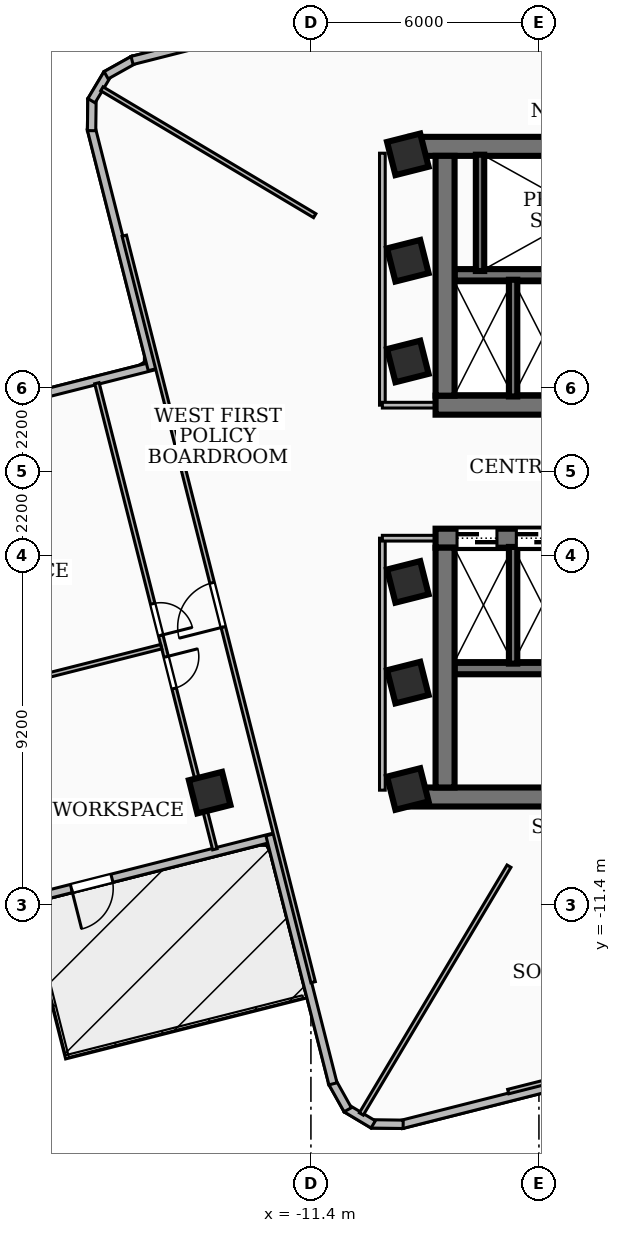
"""IFC4 building model, lengths in metres.
Left out: names, types, materials, properties, quantities, classifications, styles, units other than length and angle.
Written with IfcOpenShell. Run it as: python <this file> out.ifc"""

import sys

from ifc_helpers import new_model, si_unit, direction, frame, frame_2d, origin, origin_2d, place, context, subcontext, project, spatial, rectangle, extrude, element, fill, save


model = new_model("IFC4")
c1 = context("Model", 3, precision=1e-05, world=origin(), true_north=direction((0.0, 1.0)))
c2 = subcontext(c1, "Body", "Model", "MODEL_VIEW")
j1 = project(units=[si_unit("LENGTHUNIT", "METRE"), si_unit("PLANEANGLEUNIT", "RADIAN")], contexts=[c1])
p1 = place(None, origin())
s1 = spatial("IfcSite", under=j1, at=p1, CompositionType="ELEMENT")
p2 = place(p1, origin())
s2 = spatial("IfcBuilding", under=s1, at=p2, CompositionType="ELEMENT")
p3 = place(p2, frame((0.0, 0.0, 127.08)))
s3 = spatial("IfcBuildingStorey", under=s2, at=p3, CompositionType="ELEMENT", Elevation=127.08)
p4 = place(p3, frame((-8.78, 8.56, 0.0), z_axis=(0.0, 0.0, 1.0), x_axis=(1.0, 0.0, 0.0)))
e1 = element("IfcWall", 1, at=p4, inside=s3, PredefinedType="SHEAR", context=c2, shape_type="SweptSolid", body=[
    extrude(rectangle(XDim=17.56, YDim=0.5, at=frame_2d((8.78, 0.0))), origin(), (0.0, 0.0, 1.0), 3.34),
])
p5 = place(p3, frame((8.12, 1.75, 0.0), z_axis=(0.0, 0.0, 1.0), x_axis=(-1.0, 0.0, 0.0)))
e2 = element("IfcWall", 2, at=p5, inside=s3, PredefinedType="SHEAR", context=c2, shape_type="SweptSolid", body=[
    extrude(rectangle(XDim=16.24, YDim=0.5, at=frame_2d((8.12, 0.0))), origin(), (0.0, 0.0, 1.0), 3.34),
])
p6 = place(p5, frame((7.45, 0.0, 0.0)))
e3 = element("IfcOpeningElement", 3, at=p6, cuts=e2, PredefinedType="OPENING", context=c2, shape_type="SweptSolid", body=[
    extrude(rectangle(XDim=1.0, YDim=2.1, at=frame_2d((0.5, 1.05))), frame((0.0, 0.26, 0.0), z_axis=(0.0, -1.0, 0.0), x_axis=(1.0, 0.0, 0.0)), (0.0, 0.0, 1.0), 0.52),
])
p7 = place(p5, frame((3.85, 0.0, 0.0)))
e4 = element("IfcOpeningElement", 4, at=p7, cuts=e2, PredefinedType="OPENING", context=c2, shape_type="SweptSolid", body=[
    extrude(rectangle(XDim=0.9, YDim=2.06, at=frame_2d((0.45, 1.03))), frame((0.0, 0.26, 0.0), z_axis=(0.0, -1.0, 0.0), x_axis=(1.0, 0.0, 0.0)), (0.0, 0.0, 1.0), 0.52),
])
p8 = place(p5, frame((2.35, 0.0, 0.0)))
e5 = element("IfcOpeningElement", 5, at=p8, cuts=e2, PredefinedType="OPENING", context=c2, shape_type="SweptSolid", body=[
    extrude(rectangle(XDim=0.9, YDim=2.06, at=frame_2d((0.45, 1.03))), frame((0.0, 0.26, 0.0), z_axis=(0.0, -1.0, 0.0), x_axis=(1.0, 0.0, 0.0)), (0.0, 0.0, 1.0), 0.52),
])
p9 = place(p5, frame((0.8, 0.0, 0.0)))
e6 = element("IfcOpeningElement", 6, at=p9, cuts=e2, PredefinedType="OPENING", context=c2, shape_type="SweptSolid", body=[
    extrude(rectangle(XDim=0.9, YDim=2.06, at=frame_2d((0.45, 1.03))), frame((0.0, 0.26, 0.0), z_axis=(0.0, -1.0, 0.0), x_axis=(1.0, 0.0, 0.0)), (0.0, 0.0, 1.0), 0.52),
])
p10 = place(p3, frame((-7.87, 2.0, 0.0), z_axis=(0.0, 0.0, 1.0), x_axis=(0.0, 1.0, 0.0)))
e7 = element("IfcWall", 7, at=p10, inside=s3, PredefinedType="SHEAR", context=c2, shape_type="SweptSolid", body=[
    extrude(rectangle(XDim=6.31, YDim=0.5, at=frame_2d((3.155, 0.0))), origin(), (0.0, 0.0, 1.0), 3.34),
])
p11 = place(p3, frame((7.62, 5.18, 0.0), z_axis=(0.0, 0.0, 1.0), x_axis=(-1.0, 0.0, 0.0)))
e8 = element("IfcWall", 8, at=p11, inside=s3, PredefinedType="SOLIDWALL", context=c2, shape_type="SweptSolid", body=[
    extrude(rectangle(XDim=15.24, YDim=0.3, at=frame_2d((7.62, 0.0))), origin(), (0.0, 0.0, 1.0), 3.34),
])
p12 = place(p11, frame((5.77, 0.0, 0.0)))
e9 = element("IfcOpeningElement", 9, at=p12, cuts=e8, PredefinedType="OPENING", context=c2, shape_type="SweptSolid", body=[
    extrude(rectangle(XDim=1.1, YDim=2.15, at=frame_2d((0.55, 1.075))), frame((0.0, 0.16, 0.0), z_axis=(0.0, -1.0, 0.0), x_axis=(1.0, 0.0, 0.0)), (0.0, 0.0, 1.0), 0.32),
])
p13 = place(p11, frame((2.97, 0.0, 0.0)))
e10 = element("IfcOpeningElement", 10, at=p13, cuts=e8, PredefinedType="OPENING", context=c2, shape_type="SweptSolid", body=[
    extrude(rectangle(XDim=1.1, YDim=2.15, at=frame_2d((0.55, 1.075))), frame((0.0, 0.16, 0.0), z_axis=(0.0, -1.0, 0.0), x_axis=(1.0, 0.0, 0.0)), (0.0, 0.0, 1.0), 0.32),
])
p14 = place(p11, frame((7.97, 0.0, 0.0)))
e11 = element("IfcOpeningElement", 11, at=p14, cuts=e8, PredefinedType="OPENING", context=c2, shape_type="SweptSolid", body=[
    extrude(rectangle(XDim=1.0, YDim=2.1, at=frame_2d((0.5, 1.05))), frame((0.0, 0.16, 0.0), z_axis=(0.0, -1.0, 0.0), x_axis=(1.0, 0.0, 0.0)), (0.0, 0.0, 1.0), 0.32),
])
p15 = place(p3, frame((8.78, -8.56, 0.0), z_axis=(0.0, 0.0, 1.0), x_axis=(-1.0, 0.0, 0.0)))
e12 = element("IfcWall", 12, at=p15, inside=s3, PredefinedType="SHEAR", context=c2, shape_type="SweptSolid", body=[
    extrude(rectangle(XDim=17.56, YDim=0.5, at=frame_2d((8.78, 0.0))), origin(), (0.0, 0.0, 1.0), 3.34),
])
p16 = place(p3, frame((-8.12, -1.75, 0.0), z_axis=(0.0, 0.0, 1.0), x_axis=(1.0, 0.0, 0.0)))
e13 = element("IfcWall", 13, at=p16, inside=s3, PredefinedType="SHEAR", context=c2, shape_type="SweptSolid", body=[
    extrude(rectangle(XDim=16.24, YDim=0.5, at=frame_2d((8.12, 0.0))), origin(), (0.0, 0.0, 1.0), 3.34),
])
p17 = place(p16, frame((7.45, 0.0, 0.0)))
e14 = element("IfcOpeningElement", 14, at=p17, cuts=e13, PredefinedType="OPENING", context=c2, shape_type="SweptSolid", body=[
    extrude(rectangle(XDim=1.0, YDim=2.1, at=frame_2d((0.5, 1.05))), frame((0.0, 0.26, 0.0), z_axis=(0.0, -1.0, 0.0), x_axis=(1.0, 0.0, 0.0)), (0.0, 0.0, 1.0), 0.52),
])
p18 = place(p16, frame((12.65, 0.0, 0.0)))
e15 = element("IfcOpeningElement", 15, at=p18, cuts=e13, PredefinedType="OPENING", context=c2, shape_type="SweptSolid", body=[
    extrude(rectangle(XDim=0.9, YDim=2.06, at=frame_2d((0.45, 1.03))), frame((0.0, 0.26, 0.0), z_axis=(0.0, -1.0, 0.0), x_axis=(1.0, 0.0, 0.0)), (0.0, 0.0, 1.0), 0.52),
])
p19 = place(p16, frame((0.565, 0.0, 0.0)))
e16 = element("IfcOpeningElement", 16, at=p19, cuts=e13, PredefinedType="OPENING", context=c2, shape_type="SweptSolid", body=[
    extrude(rectangle(XDim=1.05, YDim=2.15, at=frame_2d((0.525, 1.075))), frame((0.0, 0.26, 0.0), z_axis=(0.0, -1.0, 0.0), x_axis=(1.0, 0.0, 0.0)), (0.0, 0.0, 1.0), 0.52),
])
p20 = place(p16, frame((2.125, 0.0, 0.0)))
e17 = element("IfcOpeningElement", 17, at=p20, cuts=e13, PredefinedType="OPENING", context=c2, shape_type="SweptSolid", body=[
    extrude(rectangle(XDim=1.05, YDim=2.15, at=frame_2d((0.525, 1.075))), frame((0.0, 0.26, 0.0), z_axis=(0.0, -1.0, 0.0), x_axis=(1.0, 0.0, 0.0)), (0.0, 0.0, 1.0), 0.52),
])
p21 = place(p16, frame((3.685, 0.0, 0.0)))
e18 = element("IfcOpeningElement", 18, at=p21, cuts=e13, PredefinedType="OPENING", context=c2, shape_type="SweptSolid", body=[
    extrude(rectangle(XDim=1.05, YDim=2.15, at=frame_2d((0.525, 1.075))), frame((0.0, 0.26, 0.0), z_axis=(0.0, -1.0, 0.0), x_axis=(1.0, 0.0, 0.0)), (0.0, 0.0, 1.0), 0.52),
])
p22 = place(p3, frame((-7.87, -8.31, 0.0), z_axis=(0.0, 0.0, 1.0), x_axis=(0.0, 1.0, 0.0)))
e19 = element("IfcWall", 19, at=p22, inside=s3, PredefinedType="SHEAR", context=c2, shape_type="SweptSolid", body=[
    extrude(rectangle(XDim=6.31, YDim=0.5, at=frame_2d((3.155, 0.0))), origin(), (0.0, 0.0, 1.0), 3.34),
])
p23 = place(p3, frame((-7.62, -5.18, 0.0), z_axis=(0.0, 0.0, 1.0), x_axis=(1.0, 0.0, 0.0)))
e20 = element("IfcWall", 20, at=p23, inside=s3, PredefinedType="SOLIDWALL", context=c2, shape_type="SweptSolid", body=[
    extrude(rectangle(XDim=15.24, YDim=0.3, at=frame_2d((7.62, 0.0))), origin(), (0.0, 0.0, 1.0), 3.34),
])
p24 = place(p23, frame((5.77, 0.0, 0.0)))
e21 = element("IfcOpeningElement", 21, at=p24, cuts=e20, PredefinedType="OPENING", context=c2, shape_type="SweptSolid", body=[
    extrude(rectangle(XDim=1.1, YDim=2.15, at=frame_2d((0.55, 1.075))), frame((0.0, 0.16, 0.0), z_axis=(0.0, -1.0, 0.0), x_axis=(1.0, 0.0, 0.0)), (0.0, 0.0, 1.0), 0.32),
])
p25 = place(p23, frame((7.97, 0.0, 0.0)))
e22 = element("IfcOpeningElement", 22, at=p25, cuts=e20, PredefinedType="OPENING", context=c2, shape_type="SweptSolid", body=[
    extrude(rectangle(XDim=1.0, YDim=2.1, at=frame_2d((0.5, 1.05))), frame((0.0, 0.16, 0.0), z_axis=(0.0, -1.0, 0.0), x_axis=(1.0, 0.0, 0.0)), (0.0, 0.0, 1.0), 0.32),
])
p26 = place(p3, frame((-6.95, 5.28, 0.0), z_axis=(0.0, 0.0, 1.0), x_axis=(0.0, 1.0, 0.0)))
e23 = element("IfcWall", 23, at=p26, inside=s3, PredefinedType="SOLIDWALL", context=c2, shape_type="SweptSolid", body=[
    extrude(rectangle(XDim=3.06, YDim=0.22, at=frame_2d((1.53, 0.0))), origin(), (0.0, 0.0, 1.0), 3.34),
])
for number, where, z_axis, x_axis in (
    (24, (-6.08, 1.98, 0.0), (0.0, 0.0, 1.0), (0.0, 1.0, 0.0)),
    (25, (-6.08, -5.05, 0.0), (0.0, 0.0, 1.0), (0.0, 1.0, 0.0)),
):
    element("IfcWall", number, at=place(p3, frame(where, z_axis=z_axis, x_axis=x_axis)), inside=s3, PredefinedType="SOLIDWALL", context=c2, shape_type="SweptSolid", body=[
        extrude(rectangle(XDim=3.07, YDim=0.22, at=frame_2d((1.535, 0.0))), origin(), (0.0, 0.0, 1.0), 3.34),
    ])
for number, where, z_axis, x_axis in (
    (26, (-8.85, -5.55, 0.0), (0.0, 0.0, 1.0), (0.969, 0.245, 0.0)),
    (27, (-8.85, -2.9, 0.0), (0.0, 0.0, 1.0), (0.969, 0.245, 0.0)),
    (28, (-8.85, 2.9, 0.0), (0.0, 0.0, 1.0), (0.969, 0.245, 0.0)),
    (29, (-8.85, 5.55, 0.0), (0.0, 0.0, 1.0), (0.969, 0.245, 0.0)),
    (30, (-8.85, 8.35, 0.0), (0.0, 0.0, 1.0), (0.969, 0.245, 0.0)),
    (31, (-8.85, -8.35, 0.0), (0.0, 0.0, 1.0), (0.969, 0.245, 0.0)),
    (32, (-14.064, -8.445, 0.0), (0.0, 0.0, 1.0), (0.969, 0.245, 0.0)),
):
    element("IfcColumn", number, at=place(p3, frame(where, z_axis=z_axis, x_axis=x_axis)), inside=s3, PredefinedType="COLUMN", context=c2, shape_type="SweptSolid", body=[
        extrude(rectangle(XDim=0.9, YDim=0.9, at=origin_2d()), origin(), (0.0, 0.0, 1.0), 3.6),
    ])
p27 = place(p3, frame((-12.371, -9.618, 0.0), z_axis=(0.0, 0.0, 1.0), x_axis=(-0.969434127448, -0.245351732293, 0.0)))
e33 = element("IfcWall", 33, at=p27, inside=s3, PredefinedType="SOLIDWALL", context=c2, shape_type="SweptSolid", body=[
    extrude(rectangle(XDim=13.458, YDim=0.22, at=frame_2d((6.729, 0.0))), origin(), (0.0, 0.0, 1.0), 2.644),
])
p28 = place(p27, frame((4.4, 0.0, 0.0)))
e34 = element("IfcOpeningElement", 34, at=p28, cuts=e33, PredefinedType="OPENING", context=c2, shape_type="SweptSolid", body=[
    extrude(rectangle(XDim=1.1, YDim=2.1, at=frame_2d((0.55, 1.05))), frame((0.0, 0.12, 0.0), z_axis=(0.0, -1.0, 0.0), x_axis=(1.0, 0.0, 0.0)), (0.0, 0.0, 1.0), 0.24),
])
p29 = place(p3, frame((-28.557, -0.511, 0.0), z_axis=(0.0, 0.0, 1.0), x_axis=(0.969429758912, 0.245368992613, 0.0)))
e35 = element("IfcWall", 35, at=p29, inside=s3, PredefinedType="SOLIDWALL", context=c2, shape_type="SweptSolid", body=[
    extrude(rectangle(XDim=13.457, YDim=0.22, at=frame_2d((6.729, 0.0))), origin(), (0.0, 0.0, 1.0), 3.34),
])
p30 = place(p29, frame((1.1, 0.0, 0.85)))
e36 = element("IfcOpeningElement", 36, at=p30, cuts=e35, PredefinedType="OPENING", context=c2, shape_type="SweptSolid", body=[
    extrude(rectangle(XDim=2.7, YDim=2.1, at=frame_2d((1.35, 1.05))), frame((0.0, 0.12, 0.0), z_axis=(0.0, -1.0, 0.0), x_axis=(1.0, 0.0, 0.0)), (0.0, 0.0, 1.0), 0.24),
])
p31 = place(p3, frame((-15.574, 2.684, 0.0), z_axis=(0.0, 0.0, 1.0), x_axis=(-0.245346347134, 0.969435490349, 0.0)))
e37 = element("IfcWall", 37, at=p31, inside=s3, PredefinedType="SOLIDWALL", context=c2, shape_type="SweptSolid", body=[
    extrude(rectangle(XDim=6.538, YDim=0.22, at=frame_2d((3.269, 0.0))), origin(), (0.0, 0.0, 1.0), 3.34),
])
p32 = place(p3, frame((-17.172, 8.973, 0.0), z_axis=(0.0, 0.0, 1.0), x_axis=(0.013464821393, 0.999909345183, 0.0)))
e38 = element("IfcWall", 38, at=p32, inside=s3, PredefinedType="SOLIDWALL", context=c2, shape_type="SweptSolid", body=[
    extrude(rectangle(XDim=0.834, YDim=0.22, at=frame_2d((0.417, 0.0))), origin(), (0.0, 0.0, 1.0), 3.34),
])
p33 = place(p3, frame((-17.174, 9.761, 0.0), z_axis=(0.0, 0.0, 1.0), x_axis=(0.512960801038, 0.858412031951, 0.0)))
e39 = element("IfcWall", 39, at=p33, inside=s3, PredefinedType="SOLIDWALL", context=c2, shape_type="SweptSolid", body=[
    extrude(rectangle(XDim=0.819, YDim=0.22, at=frame_2d((0.41, 0.0))), origin(), (0.0, 0.0, 1.0), 3.34),
])
p34 = place(p3, frame((-16.789, 10.431, 0.0), z_axis=(0.0, 0.0, 1.0), x_axis=(0.872870149311, 0.487952561671, 0.0)))
e40 = element("IfcWall", 40, at=p34, inside=s3, PredefinedType="SOLIDWALL", context=c2, shape_type="SweptSolid", body=[
    extrude(rectangle(XDim=0.834, YDim=0.22, at=frame_2d((0.417, 0.0))), origin(), (0.0, 0.0, 1.0), 3.34),
])
p35 = place(p3, frame((-16.107, 10.82, 0.0), z_axis=(0.0, 0.0, 1.0), x_axis=(0.969443674581, 0.245314006561, 0.0)))
e41 = element("IfcWall", 41, at=p35, inside=s3, PredefinedType="SOLIDWALL", context=c2, shape_type="SweptSolid", body=[
    extrude(rectangle(XDim=6.759, YDim=0.22, at=frame_2d((3.379, 0.0))), origin(), (0.0, 0.0, 1.0), 3.34),
])
p36 = place(p3, frame((-2.684, -15.574, 0.0), z_axis=(0.0, 0.0, 1.0), x_axis=(-0.969435490349, -0.245346347134, 0.0)))
e42 = element("IfcWall", 42, at=p36, inside=s3, PredefinedType="SOLIDWALL", context=c2, shape_type="SweptSolid", body=[
    extrude(rectangle(XDim=6.538, YDim=0.22, at=frame_2d((3.269, 0.0))), origin(), (0.0, 0.0, 1.0), 2.57),
])
p37 = place(p3, frame((-8.973, -17.172, 0.0), z_axis=(0.0, 0.0, 1.0), x_axis=(-0.999909345183, 0.013464821393, 0.0)))
e43 = element("IfcWall", 43, at=p37, inside=s3, PredefinedType="SOLIDWALL", context=c2, shape_type="SweptSolid", body=[
    extrude(rectangle(XDim=0.834, YDim=0.22, at=frame_2d((0.417, 0.0))), origin(), (0.0, 0.0, 1.0), 3.34),
])
p38 = place(p3, frame((-9.761, -17.174, 0.0), z_axis=(0.0, 0.0, 1.0), x_axis=(-0.858412031951, 0.512960801038, 0.0)))
e44 = element("IfcWall", 44, at=p38, inside=s3, PredefinedType="SOLIDWALL", context=c2, shape_type="SweptSolid", body=[
    extrude(rectangle(XDim=0.819, YDim=0.22, at=frame_2d((0.41, 0.0))), origin(), (0.0, 0.0, 1.0), 3.34),
])
p39 = place(p3, frame((-10.431, -16.789, 0.0), z_axis=(0.0, 0.0, 1.0), x_axis=(-0.487952561671, 0.872870149311, 0.0)))
e45 = element("IfcWall", 45, at=p39, inside=s3, PredefinedType="SOLIDWALL", context=c2, shape_type="SweptSolid", body=[
    extrude(rectangle(XDim=0.834, YDim=0.22, at=frame_2d((0.417, 0.0))), origin(), (0.0, 0.0, 1.0), 3.34),
])
p40 = place(p3, frame((-10.82, -16.107, 0.0), z_axis=(0.0, 0.0, 1.0), x_axis=(-0.245314006561, 0.969443674581, 0.0)))
e46 = element("IfcWall", 46, at=p40, inside=s3, PredefinedType="SOLIDWALL", context=c2, shape_type="SweptSolid", body=[
    extrude(rectangle(XDim=6.759, YDim=0.22, at=frame_2d((3.379, 0.0))), origin(), (0.0, 0.0, 1.0), 2.644),
])
p41 = place(p3, frame((-9.52, 1.75, 0.0), z_axis=(0.0, 0.0, 1.0), x_axis=(0.0, 1.0, 0.0)))
e47 = element("IfcWall", 47, at=p41, inside=s3, PredefinedType="PARTITIONING", context=c2, shape_type="SweptSolid", body=[
    extrude(rectangle(XDim=6.63, YDim=0.15, at=frame_2d((3.315, 0.0))), origin(), (0.0, 0.0, 1.0), 2.57),
])
p42 = place(p3, frame((-7.85, 1.75, 0.0), z_axis=(0.0, 0.0, 1.0), x_axis=(-1.0, 0.0, 0.0)))
e48 = element("IfcWall", 48, at=p42, inside=s3, PredefinedType="PARTITIONING", context=c2, shape_type="SweptSolid", body=[
    extrude(rectangle(XDim=1.67, YDim=0.15, at=frame_2d((0.835, 0.0))), origin(), (0.0, 0.0, 1.0), 2.57),
])
p43 = place(p3, frame((-9.52, -8.38, 0.0), z_axis=(0.0, 0.0, 1.0), x_axis=(0.0, 1.0, 0.0)))
e49 = element("IfcWall", 49, at=p43, inside=s3, PredefinedType="PARTITIONING", context=c2, shape_type="SweptSolid", body=[
    extrude(rectangle(XDim=6.63, YDim=0.15, at=frame_2d((3.315, 0.0))), origin(), (0.0, 0.0, 1.0), 2.57),
])
p44 = place(p3, frame((-7.85, -1.75, 0.0), z_axis=(0.0, 0.0, 1.0), x_axis=(-1.0, 0.0, 0.0)))
e50 = element("IfcWall", 50, at=p44, inside=s3, PredefinedType="PARTITIONING", context=c2, shape_type="SweptSolid", body=[
    extrude(rectangle(XDim=1.67, YDim=0.15, at=frame_2d((0.835, 0.0))), origin(), (0.0, 0.0, 1.0), 2.57),
])
p45 = place(p3, frame((-11.3, 6.736, 0.0), z_axis=(0.0, 0.0, 1.0), x_axis=(-0.858979599017, 0.512009812868, 0.0)))
e51 = element("IfcWall", 51, at=p45, inside=s3, PredefinedType="PARTITIONING", context=c2, shape_type="SweptSolid", body=[
    extrude(rectangle(XDim=6.519, YDim=0.12, at=frame_2d((3.26, 0.0))), origin(), (0.0, 0.0, 1.0), 3.34),
])
p46 = place(p3, frame((-6.188, -10.38, 0.0), z_axis=(0.0, 0.0, 1.0), x_axis=(-0.511972353143, -0.859001926434, 0.0)))
e52 = element("IfcWall", 52, at=p46, inside=s3, PredefinedType="PARTITIONING", context=c2, shape_type="SweptSolid", body=[
    extrude(rectangle(XDim=7.59, YDim=0.12, at=frame_2d((3.795, 0.0))), origin(), (0.0, 0.0, 1.0), 2.57),
])
p47 = place(p3, frame((-11.342, -13.433, 0.0), z_axis=(0.0, 0.0, 1.0), x_axis=(-0.24525085526, 0.969459652587, 0.0)))
e53 = element("IfcWall", 53, at=p47, inside=s3, PredefinedType="PARTITIONING", context=c2, shape_type="SweptSolid", body=[
    extrude(rectangle(XDim=20.261, YDim=0.12, at=frame_2d((10.13, 0.0))), origin(), (0.0, 0.0, 1.0), 2.57),
])
p48 = place(p47, frame((9.64, 0.0, 0.0)))
e54 = element("IfcOpeningElement", 54, at=p48, cuts=e53, PredefinedType="OPENING", context=c2, shape_type="SweptSolid", body=[
    extrude(rectangle(XDim=1.2, YDim=2.1, at=frame_2d((0.6, 1.05))), frame((0.0, 0.07, 0.0), z_axis=(0.0, -1.0, 0.0), x_axis=(1.0, 0.0, 0.0)), (0.0, 0.0, 1.0), 0.14),
])
p49 = place(p3, frame((-15.339, -4.604, 0.0), z_axis=(0.0, 0.0, 1.0), x_axis=(-0.969461701565, -0.245242755651, 0.0)))
e55 = element("IfcWall", 55, at=p49, inside=s3, PredefinedType="PARTITIONING", context=c2, shape_type="SweptSolid", body=[
    extrude(rectangle(XDim=13.215, YDim=0.12, at=frame_2d((6.608, 0.0))), origin(), (0.0, 0.0, 1.0), 2.72),
])
p50 = place(p3, frame((-17.032, 2.328, 0.0), z_axis=(0.0, 0.0, 1.0), x_axis=(0.245381918011, -0.969426487318, 0.0)))
e56 = element("IfcWall", 56, at=p50, inside=s3, PredefinedType="PARTITIONING", context=c2, shape_type="SweptSolid", body=[
    extrude(rectangle(XDim=12.65, YDim=0.12, at=frame_2d((6.325, 0.0))), origin(), (0.0, 0.0, 1.0), 2.57),
])
p51 = place(p50, frame((5.985, 0.0, 0.0)))
e57 = element("IfcOpeningElement", 57, at=p51, cuts=e56, PredefinedType="OPENING", context=c2, shape_type="SweptSolid", body=[
    extrude(rectangle(XDim=0.86, YDim=2.04, at=frame_2d((0.43, 1.02))), frame((0.0, 0.07, 0.0), z_axis=(0.0, -1.0, 0.0), x_axis=(1.0, 0.0, 0.0)), (0.0, 0.0, 1.0), 0.14),
])
p52 = place(p50, frame((7.425, 0.0, 0.0)))
e58 = element("IfcOpeningElement", 58, at=p52, cuts=e56, PredefinedType="OPENING", context=c2, shape_type="SweptSolid", body=[
    extrude(rectangle(XDim=0.86, YDim=2.04, at=frame_2d((0.43, 1.02))), frame((0.0, 0.07, 0.0), z_axis=(0.0, -1.0, 0.0), x_axis=(1.0, 0.0, 0.0)), (0.0, 0.0, 1.0), 0.14),
])
p53 = place(p3, frame((13.433, -11.342, 0.0), z_axis=(0.0, 0.0, 1.0), x_axis=(-0.969459652587, -0.24525085526, 0.0)))
e59 = element("IfcWall", 59, at=p53, inside=s3, PredefinedType="PARTITIONING", context=c2, shape_type="SweptSolid", body=[
    extrude(rectangle(XDim=20.261, YDim=0.12, at=frame_2d((10.13, 0.0))), origin(), (0.0, 0.0, 1.0), 2.57),
])
p54 = place(p53, frame((9.64, 0.0, 0.0)))
e60 = element("IfcOpeningElement", 60, at=p54, cuts=e59, PredefinedType="OPENING", context=c2, shape_type="SweptSolid", body=[
    extrude(rectangle(XDim=1.2, YDim=2.1, at=frame_2d((0.6, 1.05))), frame((0.0, 0.07, 0.0), z_axis=(0.0, -1.0, 0.0), x_axis=(1.0, 0.0, 0.0)), (0.0, 0.0, 1.0), 0.14),
])
p55 = place(p28, origin())
e61 = element("IfcDoor", 61, at=p55, inside=s3, OperationType="SINGLE_SWING_RIGHT", PredefinedType="DOOR", context=c2, shape_type="SweptSolid", body=[
    extrude(rectangle(XDim=1.1, YDim=2.1, at=frame_2d((0.55, 1.05))), frame((0.0, 0.025, 0.0), z_axis=(0.0, -1.0, 0.0), x_axis=(1.0, 0.0, 0.0)), (0.0, 0.0, 1.0), 0.05),
])
fill(e34, e61)
p56 = place(p19, origin())
e62 = element("IfcDoor", 62, at=p56, inside=s3, OperationType="DOUBLE_DOOR_SLIDING", PredefinedType="DOOR", context=c2, shape_type="SweptSolid", body=[
    extrude(rectangle(XDim=1.05, YDim=2.15, at=frame_2d((0.525, 1.075))), frame((0.0, 0.025, 0.0), z_axis=(0.0, -1.0, 0.0), x_axis=(1.0, 0.0, 0.0)), (0.0, 0.0, 1.0), 0.05),
])
fill(e16, e62)
p57 = place(p20, origin())
e63 = element("IfcDoor", 63, at=p57, inside=s3, OperationType="DOUBLE_DOOR_SLIDING", PredefinedType="DOOR", context=c2, shape_type="SweptSolid", body=[
    extrude(rectangle(XDim=1.05, YDim=2.15, at=frame_2d((0.525, 1.075))), frame((0.0, 0.025, 0.0), z_axis=(0.0, -1.0, 0.0), x_axis=(1.0, 0.0, 0.0)), (0.0, 0.0, 1.0), 0.05),
])
fill(e17, e63)
p58 = place(p48, origin())
e64 = element("IfcDoor", 64, at=p58, inside=s3, OperationType="SINGLE_SWING_LEFT", PredefinedType="DOOR", context=c2, shape_type="SweptSolid", body=[
    extrude(rectangle(XDim=1.2, YDim=2.1, at=frame_2d((0.6, 1.05))), frame((0.0, 0.025, 0.0), z_axis=(0.0, -1.0, 0.0), x_axis=(1.0, 0.0, 0.0)), (0.0, 0.0, 1.0), 0.05),
])
fill(e54, e64)
p59 = place(p51, origin())
e65 = element("IfcDoor", 65, at=p59, inside=s3, OperationType="SINGLE_SWING_RIGHT", PredefinedType="DOOR", context=c2, shape_type="SweptSolid", body=[
    extrude(rectangle(XDim=0.86, YDim=2.04, at=frame_2d((0.43, 1.02))), frame((0.0, 0.025, 0.0), z_axis=(0.0, -1.0, 0.0), x_axis=(1.0, 0.0, 0.0)), (0.0, 0.0, 1.0), 0.05),
])
fill(e57, e65)
p60 = place(p52, origin())
e66 = element("IfcDoor", 66, at=p60, inside=s3, OperationType="SINGLE_SWING_LEFT", PredefinedType="DOOR", context=c2, shape_type="SweptSolid", body=[
    extrude(rectangle(XDim=0.86, YDim=2.04, at=frame_2d((0.43, 1.02))), frame((0.0, 0.025, 0.0), z_axis=(0.0, -1.0, 0.0), x_axis=(1.0, 0.0, 0.0)), (0.0, 0.0, 1.0), 0.05),
])
fill(e58, e66)
save(model, sys.argv[1])
